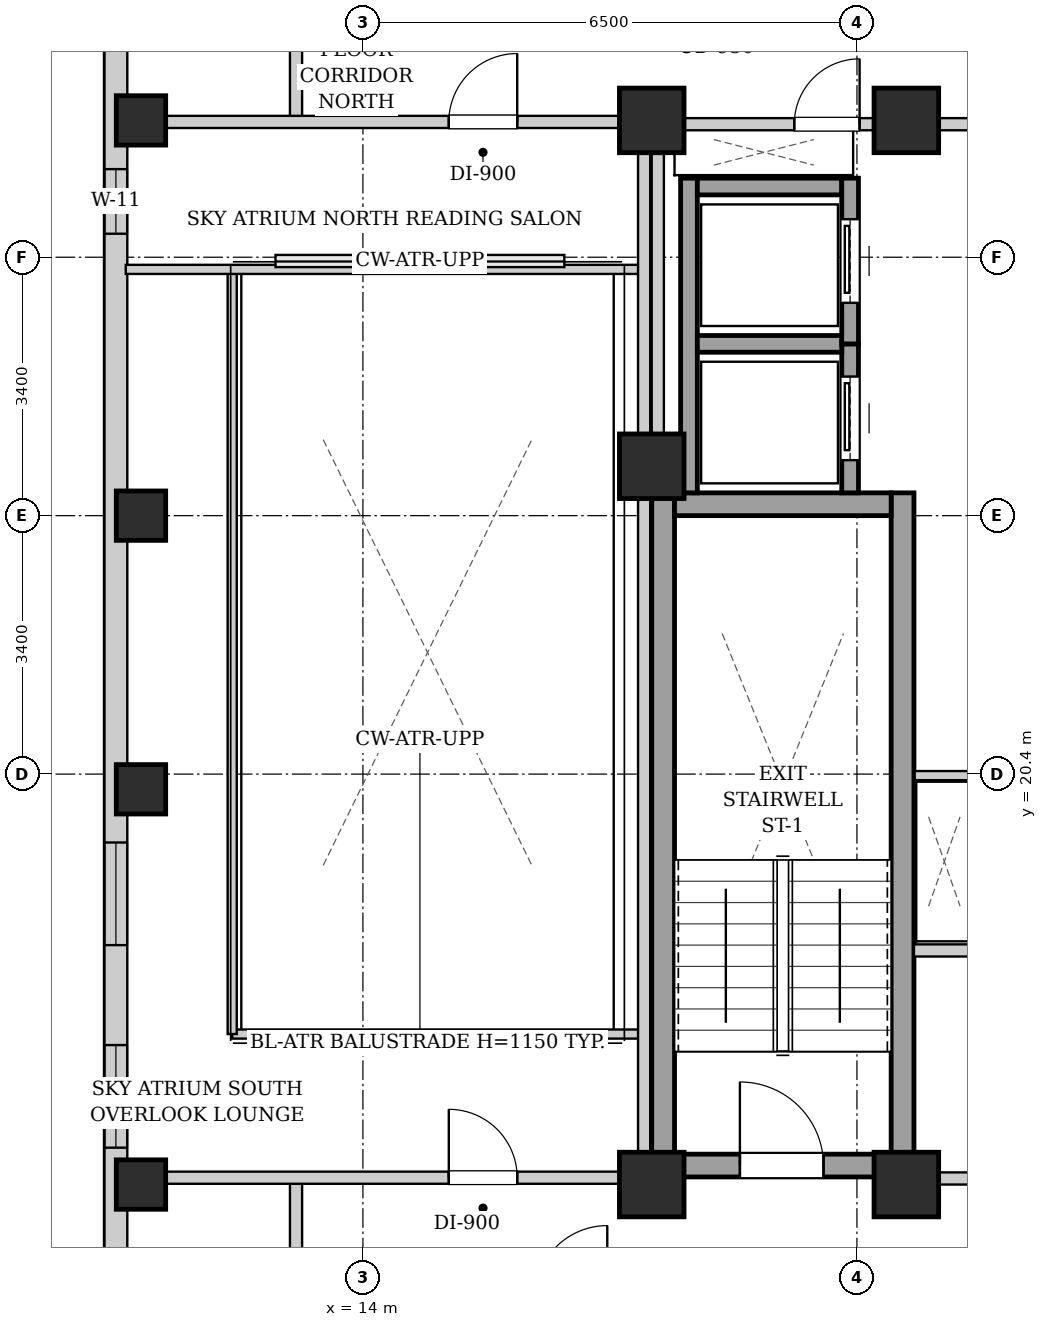
"""IFC4 building model, lengths in metres.
Left out: names, types, materials, properties, quantities, classifications, styles, units other than length and angle.
Written with IfcOpenShell. Run it as: python <this file> out.ifc"""

import sys

from ifc_helpers import new_model, si_unit, direction, frame, frame_2d, origin, origin_2d, place, context, subcontext, project, spatial, rectangle, extrude, element, fill, save


model = new_model("IFC4")
c1 = context("Model", 3, precision=1e-05, world=origin(), true_north=direction((0.0, 1.0)))
c2 = subcontext(c1, "Body", "Model", "MODEL_VIEW")
j1 = project(units=[si_unit("LENGTHUNIT", "METRE"), si_unit("PLANEANGLEUNIT", "RADIAN")], contexts=[c1])
p1 = place(None, origin())
s1 = spatial("IfcSite", under=j1, at=p1, CompositionType="ELEMENT")
p2 = place(p1, origin())
s2 = spatial("IfcBuilding", under=s1, at=p2, CompositionType="ELEMENT")
p3 = place(p2, frame((0.0, 0.0, 177.7)))
s3 = spatial("IfcBuildingStorey", under=s2, at=p3, CompositionType="ELEMENT", Elevation=177.7)
for number, where, z_axis, x_axis in (
    (1, (11.08, 15.0, 0.0), (0.0, 0.0, 1.0), (1.0, 0.0, 0.0)),
    (2, (11.08, 20.2, 0.0), (0.0, 0.0, 1.0), (1.0, 0.0, 0.0)),
    (3, (11.08, 23.8, 0.0), (0.0, 0.0, 1.0), (1.0, 0.0, 0.0)),
    (4, (11.08, 29.0, 0.0), (0.0, 0.0, 1.0), (1.0, 0.0, 0.0)),
):
    element("IfcColumn", number, at=place(p3, frame(where, z_axis=z_axis, x_axis=x_axis)), inside=s3, PredefinedType="COLUMN", context=c2, shape_type="SweptSolid", body=[
        extrude(rectangle(XDim=0.65, YDim=0.65, at=origin_2d()), origin(), (0.0, 0.0, 1.0), 3.3),
    ])
for number, where, z_axis, x_axis in (
    (5, (17.8, 15.0, 0.0), (0.0, 0.0, 1.0), (1.0, 0.0, 0.0)),
    (6, (21.15, 15.0, 0.0), (0.0, 0.0, 1.0), (1.0, 0.0, 0.0)),
    (7, (17.8, 29.0, 0.0), (0.0, 0.0, 1.0), (1.0, 0.0, 0.0)),
    (8, (21.15, 29.0, 0.0), (0.0, 0.0, 1.0), (1.0, 0.0, 0.0)),
    (9, (17.8, 24.45, 0.0), (0.0, 0.0, 1.0), (1.0, 0.0, 0.0)),
):
    element("IfcColumn", number, at=place(p3, frame(where, z_axis=z_axis, x_axis=x_axis)), inside=s3, PredefinedType="COLUMN", context=c2, shape_type="SweptSolid", body=[
        extrude(rectangle(XDim=0.85, YDim=0.85, at=origin_2d()), origin(), (0.0, 0.0, 1.0), 3.3),
    ])
p4 = place(p3, frame((10.75, 6.3, 0.0), z_axis=(0.0, 0.0, 1.0), x_axis=(0.0, 1.0, 0.0)))
e10 = element("IfcWall", 10, at=p4, inside=s3, PredefinedType="SOLIDWALL", context=c2, shape_type="SweptSolid", body=[
    extrude(rectangle(XDim=31.4, YDim=0.3, at=frame_2d((15.7, 0.0))), origin(), (0.0, 0.0, 1.0), 3.04),
])
p5 = place(p4, frame((1.653, 0.0, 0.55)))
e11 = element("IfcOpeningElement", 11, at=p5, cuts=e10, PredefinedType="OPENING", context=c2, shape_type="SweptSolid", body=[
    extrude(rectangle(XDim=1.35, YDim=1.2, at=frame_2d((0.675, 0.6))), frame((0.0, 0.16, 0.0), z_axis=(0.0, -1.0, 0.0), x_axis=(1.0, 0.0, 0.0)), (0.0, 0.0, 1.0), 0.32),
])
p6 = place(p4, frame((11.85, 0.0, 0.55)))
e12 = element("IfcOpeningElement", 12, at=p6, cuts=e10, PredefinedType="OPENING", context=c2, shape_type="SweptSolid", body=[
    extrude(rectangle(XDim=1.35, YDim=1.2, at=frame_2d((0.675, 0.6))), frame((0.0, 0.16, 0.0), z_axis=(0.0, -1.0, 0.0), x_axis=(1.0, 0.0, 0.0)), (0.0, 0.0, 1.0), 0.32),
])
p7 = place(p4, frame((9.185, 0.0, 0.55)))
e13 = element("IfcOpeningElement", 13, at=p7, cuts=e10, PredefinedType="OPENING", context=c2, shape_type="SweptSolid", body=[
    extrude(rectangle(XDim=1.35, YDim=1.2, at=frame_2d((0.675, 0.6))), frame((0.0, 0.16, 0.0), z_axis=(0.0, -1.0, 0.0), x_axis=(1.0, 0.0, 0.0)), (0.0, 0.0, 1.0), 0.32),
])
p8 = place(p4, frame((21.209, 0.0, 0.55)))
e14 = element("IfcOpeningElement", 14, at=p8, cuts=e10, PredefinedType="OPENING", context=c2, shape_type="SweptSolid", body=[
    extrude(rectangle(XDim=0.85, YDim=1.2, at=frame_2d((0.425, 0.6))), frame((0.0, 0.16, 0.0), z_axis=(0.0, -1.0, 0.0), x_axis=(1.0, 0.0, 0.0)), (0.0, 0.0, 1.0), 0.32),
])
for number, where, z_axis, x_axis in (
    (15, (17.95, 15.1, 0.0), (0.0, 0.0, 1.0), (0.0, 1.0, 0.0)),
    (16, (21.1, 15.1, 0.0), (0.0, 0.0, 1.0), (0.0, 1.0, 0.0)),
):
    element("IfcWall", number, at=place(p3, frame(where, z_axis=z_axis, x_axis=x_axis)), inside=s3, PredefinedType="SHEAR", context=c2, shape_type="SweptSolid", body=[
        extrude(rectangle(XDim=9.0, YDim=0.3, at=frame_2d((4.5, 0.0))), origin(), (0.0, 0.0, 1.0), 3.04),
    ])
p9 = place(p3, frame((18.1, 23.95, 0.0), z_axis=(0.0, 0.0, 1.0), x_axis=(1.0, 0.0, 0.0)))
e17 = element("IfcWall", 17, at=p9, inside=s3, PredefinedType="SHEAR", context=c2, shape_type="SweptSolid", body=[
    extrude(rectangle(XDim=2.85, YDim=0.3, at=frame_2d((1.425, 0.0))), origin(), (0.0, 0.0, 1.0), 3.04),
])
p10 = place(p3, frame((18.1, 15.25, 0.0), z_axis=(0.0, 0.0, 1.0), x_axis=(1.0, 0.0, 0.0)))
e18 = element("IfcWall", 18, at=p10, inside=s3, PredefinedType="SHEAR", context=c2, shape_type="SweptSolid", body=[
    extrude(rectangle(XDim=2.85, YDim=0.3, at=frame_2d((1.425, 0.0))), origin(), (0.0, 0.0, 1.0), 3.04),
])
p11 = place(p10, frame((0.86, 0.0, 0.0)))
e19 = element("IfcOpeningElement", 19, at=p11, cuts=e18, PredefinedType="OPENING", context=c2, shape_type="SweptSolid", body=[
    extrude(rectangle(XDim=1.1, YDim=2.05, at=frame_2d((0.55, 1.025))), frame((0.0, 0.16, 0.0), z_axis=(0.0, -1.0, 0.0), x_axis=(1.0, 0.0, 0.0)), (0.0, 0.0, 1.0), 0.32),
])
p12 = place(p3, frame((18.29, 24.1, 0.0), z_axis=(0.0, 0.0, 1.0), x_axis=(0.0, 1.0, 0.0)))
e20 = element("IfcWall", 20, at=p12, inside=s3, PredefinedType="SHEAR", context=c2, shape_type="SweptSolid", body=[
    extrude(rectangle(XDim=4.14, YDim=0.22, at=frame_2d((2.07, 0.0))), origin(), (0.0, 0.0, 1.0), 3.04),
])
p13 = place(p3, frame((20.41, 24.1, 0.0), z_axis=(0.0, 0.0, 1.0), x_axis=(0.0, 1.0, 0.0)))
e21 = element("IfcWall", 21, at=p13, inside=s3, PredefinedType="SHEAR", context=c2, shape_type="SweptSolid", body=[
    extrude(rectangle(XDim=1.96, YDim=0.22, at=frame_2d((0.98, 0.0))), origin(), (0.0, 0.0, 1.0), 3.04),
])
p14 = place(p13, frame((0.43, 0.0, 0.0)))
e22 = element("IfcOpeningElement", 22, at=p14, cuts=e21, PredefinedType="OPENING", context=c2, shape_type="SweptSolid", body=[
    extrude(rectangle(XDim=1.1, YDim=2.15, at=frame_2d((0.55, 1.075))), frame((0.0, 0.12, 0.0), z_axis=(0.0, -1.0, 0.0), x_axis=(1.0, 0.0, 0.0)), (0.0, 0.0, 1.0), 0.24),
])
for number, where, z_axis, x_axis in (
    (23, (18.4, 26.06, 0.0), (0.0, 0.0, 1.0), (1.0, 0.0, 0.0)),
    (24, (18.4, 28.13, 0.0), (0.0, 0.0, 1.0), (1.0, 0.0, 0.0)),
):
    element("IfcWall", number, at=place(p3, frame(where, z_axis=z_axis, x_axis=x_axis)), inside=s3, PredefinedType="SHEAR", context=c2, shape_type="SweptSolid", body=[
        extrude(rectangle(XDim=1.9, YDim=0.22, at=frame_2d((0.95, 0.0))), origin(), (0.0, 0.0, 1.0), 3.04),
    ])
p15 = place(p3, frame((20.41, 26.06, 0.0), z_axis=(0.0, 0.0, 1.0), x_axis=(0.0, 1.0, 0.0)))
e25 = element("IfcWall", 25, at=p15, inside=s3, PredefinedType="SHEAR", context=c2, shape_type="SweptSolid", body=[
    extrude(rectangle(XDim=2.18, YDim=0.22, at=frame_2d((1.09, 0.0))), origin(), (0.0, 0.0, 1.0), 3.04),
])
p16 = place(p15, frame((0.54, 0.0, 0.0)))
e26 = element("IfcOpeningElement", 26, at=p16, cuts=e25, PredefinedType="OPENING", context=c2, shape_type="SweptSolid", body=[
    extrude(rectangle(XDim=1.1, YDim=2.15, at=frame_2d((0.55, 1.075))), frame((0.0, 0.12, 0.0), z_axis=(0.0, -1.0, 0.0), x_axis=(1.0, 0.0, 0.0)), (0.0, 0.0, 1.0), 0.24),
])
p17 = place(p3, frame((21.25, 15.08, 0.0), z_axis=(0.0, 0.0, 1.0), x_axis=(1.0, 0.0, 0.0)))
e27 = element("IfcWall", 27, at=p17, inside=s3, PredefinedType="PARTITIONING", context=c2, shape_type="SweptSolid", body=[
    extrude(rectangle(XDim=8.5, YDim=0.16, at=frame_2d((4.25, 0.0))), origin(), (0.0, 0.0, 1.0), 2.556),
])
p18 = place(p17, frame((3.725, 0.0, 0.0)))
e28 = element("IfcOpeningElement", 28, at=p18, cuts=e27, PredefinedType="OPENING", context=c2, shape_type="SweptSolid", body=[
    extrude(rectangle(XDim=1.05, YDim=2.05, at=frame_2d((0.525, 1.025))), frame((0.0, 0.09, 0.0), z_axis=(0.0, -1.0, 0.0), x_axis=(1.0, 0.0, 0.0)), (0.0, 0.0, 1.0), 0.18),
])
p19 = place(p3, frame((21.25, 18.08, 0.0), z_axis=(0.0, 0.0, 1.0), x_axis=(1.0, 0.0, 0.0)))
e29 = element("IfcWall", 29, at=p19, inside=s3, PredefinedType="PARTITIONING", context=c2, shape_type="SweptSolid", body=[
    extrude(rectangle(XDim=1.1, YDim=0.16, at=frame_2d((0.55, 0.0))), origin(), (0.0, 0.0, 1.0), 3.04),
])
p20 = place(p3, frame((17.88, 24.12, 0.0), z_axis=(0.0, 0.0, 1.0), x_axis=(0.0, 1.0, 0.0)))
e30 = element("IfcWall", 30, at=p20, inside=s3, PredefinedType="PARTITIONING", context=c2, shape_type="SweptSolid", body=[
    extrude(rectangle(XDim=4.76, YDim=0.16, at=frame_2d((2.38, 0.0))), origin(), (0.0, 0.0, 1.0), 2.375),
])
p21 = place(p3, frame((17.96, 28.95, 0.0), z_axis=(0.0, 0.0, 1.0), x_axis=(1.0, 0.0, 0.0)))
e31 = element("IfcWall", 31, at=p21, inside=s3, PredefinedType="PARTITIONING", context=c2, shape_type="SweptSolid", body=[
    extrude(rectangle(XDim=4.29, YDim=0.16, at=frame_2d((2.145, 0.0))), origin(), (0.0, 0.0, 1.0), 2.556),
])
p22 = place(p21, frame((1.715, 0.0, 0.0)))
e32 = element("IfcOpeningElement", 32, at=p22, cuts=e31, PredefinedType="OPENING", context=c2, shape_type="SweptSolid", body=[
    extrude(rectangle(XDim=0.86, YDim=2.05, at=frame_2d((0.43, 1.025))), frame((0.0, 0.09, 0.0), z_axis=(0.0, -1.0, 0.0), x_axis=(1.0, 0.0, 0.0)), (0.0, 0.0, 1.0), 0.18),
])
p23 = place(p3, frame((22.28, 20.38, 0.0), z_axis=(0.0, 0.0, 1.0), x_axis=(-1.0, 0.0, 0.0)))
e33 = element("IfcWall", 33, at=p23, inside=s3, PredefinedType="PARTITIONING", context=c2, shape_type="SweptSolid", body=[
    extrude(rectangle(XDim=1.02, YDim=0.12, at=frame_2d((0.51, 0.0))), origin(), (0.0, 0.0, 1.0), 3.04),
])
for number, where, z_axis, x_axis in (
    (34, (13.12, 13.51, 0.0), (0.0, 0.0, 1.0), (0.0, 1.0, 0.0)),
    (35, (13.12, 28.98, 0.0), (0.0, 0.0, 1.0), (0.0, 1.0, 0.0)),
):
    element("IfcWall", number, at=place(p3, frame(where, z_axis=z_axis, x_axis=x_axis)), inside=s3, PredefinedType="PARTITIONING", context=c2, shape_type="SweptSolid", body=[
        extrude(rectangle(XDim=1.58, YDim=0.16, at=frame_2d((0.79, 0.0))), origin(), (0.0, 0.0, 1.0), 3.04),
    ])
p24 = place(p3, frame((10.88, 15.09, 0.0), z_axis=(0.0, 0.0, 1.0), x_axis=(1.0, 0.0, 0.0)))
e36 = element("IfcWall", 36, at=p24, inside=s3, PredefinedType="PARTITIONING", context=c2, shape_type="SweptSolid", body=[
    extrude(rectangle(XDim=6.88, YDim=0.16, at=frame_2d((3.44, 0.0))), origin(), (0.0, 0.0, 1.0), 2.556),
])
p25 = place(p24, frame((4.25, 0.0, 0.0)))
e37 = element("IfcOpeningElement", 37, at=p25, cuts=e36, PredefinedType="OPENING", context=c2, shape_type="SweptSolid", body=[
    extrude(rectangle(XDim=0.9, YDim=2.05, at=frame_2d((0.45, 1.025))), frame((0.0, 0.09, 0.0), z_axis=(0.0, -1.0, 0.0), x_axis=(1.0, 0.0, 0.0)), (0.0, 0.0, 1.0), 0.18),
])
p26 = place(p3, frame((12.28, 16.98, 0.0), z_axis=(0.0, 0.0, 1.0), x_axis=(1.0, 0.0, 0.0)))
e38 = element("IfcWall", 38, at=p26, inside=s3, PredefinedType="PARTITIONING", context=c2, shape_type="SweptSolid", body=[
    extrude(rectangle(XDim=5.48, YDim=0.12, at=frame_2d((2.74, 0.0))), origin(), (0.0, 0.0, 1.0), 3.04),
])
p27 = place(p3, frame((12.28, 16.98, 0.0), z_axis=(0.0, 0.0, 1.0), x_axis=(0.0, 1.0, 0.0)))
e39 = element("IfcWall", 39, at=p27, inside=s3, PredefinedType="PARTITIONING", context=c2, shape_type="SweptSolid", body=[
    extrude(rectangle(XDim=10.04, YDim=0.12, at=frame_2d((5.02, 0.0))), origin(), (0.0, 0.0, 1.0), 3.04),
])
p28 = place(p3, frame((10.88, 28.98, 0.0), z_axis=(0.0, 0.0, 1.0), x_axis=(1.0, 0.0, 0.0)))
e40 = element("IfcWall", 40, at=p28, inside=s3, PredefinedType="PARTITIONING", context=c2, shape_type="SweptSolid", body=[
    extrude(rectangle(XDim=6.88, YDim=0.16, at=frame_2d((3.44, 0.0))), origin(), (0.0, 0.0, 1.0), 2.556),
])
p29 = place(p28, frame((4.25, 0.0, 0.0)))
e41 = element("IfcOpeningElement", 41, at=p29, cuts=e40, PredefinedType="OPENING", context=c2, shape_type="SweptSolid", body=[
    extrude(rectangle(XDim=0.9, YDim=2.05, at=frame_2d((0.45, 1.025))), frame((0.0, 0.09, 0.0), z_axis=(0.0, -1.0, 0.0), x_axis=(1.0, 0.0, 0.0)), (0.0, 0.0, 1.0), 0.18),
])
p30 = place(p3, frame((10.88, 27.04, 0.0), z_axis=(0.0, 0.0, 1.0), x_axis=(1.0, 0.0, 0.0)))
e42 = element("IfcWall", 42, at=p30, inside=s3, PredefinedType="PARTITIONING", context=c2, shape_type="SweptSolid", body=[
    extrude(rectangle(XDim=6.88, YDim=0.12, at=frame_2d((3.44, 0.0))), origin(), (0.0, 0.0, 1.0), 3.04),
])
p31 = place(p3, frame((17.7, 15.02, 0.0), z_axis=(0.0, 0.0, 1.0), x_axis=(0.0, 1.0, 0.0)))
e43 = element("IfcWall", 43, at=p31, inside=s3, PredefinedType="PARTITIONING", context=c2, shape_type="SweptSolid", body=[
    extrude(rectangle(XDim=13.98, YDim=0.16, at=frame_2d((6.99, 0.0))), origin(), (0.0, 0.0, 1.0), 2.375),
])
p32 = place(p11, origin())
e44 = element("IfcDoor", 44, at=p32, inside=s3, OperationType="SINGLE_SWING_LEFT", PredefinedType="DOOR", context=c2, shape_type="SweptSolid", body=[
    extrude(rectangle(XDim=1.1, YDim=2.05, at=frame_2d((0.55, 1.025))), frame((0.0, 0.025, 0.0), z_axis=(0.0, -1.0, 0.0), x_axis=(1.0, 0.0, 0.0)), (0.0, 0.0, 1.0), 0.05),
])
fill(e19, e44)
p33 = place(p14, origin())
e45 = element("IfcDoor", 45, at=p33, inside=s3, OperationType="SLIDING_TO_LEFT", PredefinedType="DOOR", context=c2, shape_type="SweptSolid", body=[
    extrude(rectangle(XDim=1.1, YDim=2.15, at=frame_2d((0.55, 1.075))), frame((0.0, 0.025, 0.0), z_axis=(0.0, -1.0, 0.0), x_axis=(1.0, 0.0, 0.0)), (0.0, 0.0, 1.0), 0.05),
])
fill(e22, e45)
p34 = place(p16, origin())
e46 = element("IfcDoor", 46, at=p34, inside=s3, OperationType="SLIDING_TO_LEFT", PredefinedType="DOOR", context=c2, shape_type="SweptSolid", body=[
    extrude(rectangle(XDim=1.1, YDim=2.15, at=frame_2d((0.55, 1.075))), frame((0.0, 0.025, 0.0), z_axis=(0.0, -1.0, 0.0), x_axis=(1.0, 0.0, 0.0)), (0.0, 0.0, 1.0), 0.05),
])
fill(e26, e46)
p35 = place(p22, origin())
e47 = element("IfcDoor", 47, at=p35, inside=s3, OperationType="SINGLE_SWING_RIGHT", PredefinedType="DOOR", context=c2, shape_type="SweptSolid", body=[
    extrude(rectangle(XDim=0.86, YDim=2.05, at=frame_2d((0.43, 1.025))), frame((0.0, 0.025, 0.0), z_axis=(0.0, -1.0, 0.0), x_axis=(1.0, 0.0, 0.0)), (0.0, 0.0, 1.0), 0.05),
])
fill(e32, e47)
p36 = place(p25, origin())
e48 = element("IfcDoor", 48, at=p36, inside=s3, OperationType="SINGLE_SWING_LEFT", PredefinedType="DOOR", context=c2, shape_type="SweptSolid", body=[
    extrude(rectangle(XDim=0.9, YDim=2.05, at=frame_2d((0.45, 1.025))), frame((0.0, 0.025, 0.0), z_axis=(0.0, -1.0, 0.0), x_axis=(1.0, 0.0, 0.0)), (0.0, 0.0, 1.0), 0.05),
])
fill(e37, e48)
p37 = place(p29, origin())
e49 = element("IfcDoor", 49, at=p37, inside=s3, OperationType="SINGLE_SWING_RIGHT", PredefinedType="DOOR", context=c2, shape_type="SweptSolid", body=[
    extrude(rectangle(XDim=0.9, YDim=2.05, at=frame_2d((0.45, 1.025))), frame((0.0, 0.025, 0.0), z_axis=(0.0, -1.0, 0.0), x_axis=(1.0, 0.0, 0.0)), (0.0, 0.0, 1.0), 0.05),
])
fill(e41, e49)
p38 = place(p6, origin())
e50 = element("IfcWindow", 50, at=p38, inside=s3, PartitioningType="SINGLE_PANEL", PredefinedType="WINDOW", context=c2, shape_type="SweptSolid", body=[
    extrude(rectangle(XDim=1.35, YDim=1.2, at=frame_2d((0.675, 0.6))), frame((0.0, 0.03, 0.0), z_axis=(0.0, -1.0, 0.0), x_axis=(1.0, 0.0, 0.0)), (0.0, 0.0, 1.0), 0.06),
])
fill(e12, e50)
p39 = place(p7, origin())
e51 = element("IfcWindow", 51, at=p39, inside=s3, PartitioningType="SINGLE_PANEL", PredefinedType="WINDOW", context=c2, shape_type="SweptSolid", body=[
    extrude(rectangle(XDim=1.35, YDim=1.2, at=frame_2d((0.675, 0.6))), frame((0.0, 0.03, 0.0), z_axis=(0.0, -1.0, 0.0), x_axis=(1.0, 0.0, 0.0)), (0.0, 0.0, 1.0), 0.06),
])
fill(e13, e51)
p40 = place(p8, origin())
e52 = element("IfcWindow", 52, at=p40, inside=s3, PartitioningType="SINGLE_PANEL", PredefinedType="WINDOW", context=c2, shape_type="SweptSolid", body=[
    extrude(rectangle(XDim=0.85, YDim=1.2, at=frame_2d((0.425, 0.6))), frame((0.0, 0.03, 0.0), z_axis=(0.0, -1.0, 0.0), x_axis=(1.0, 0.0, 0.0)), (0.0, 0.0, 1.0), 0.06),
])
fill(e14, e52)
save(model, sys.argv[1])
